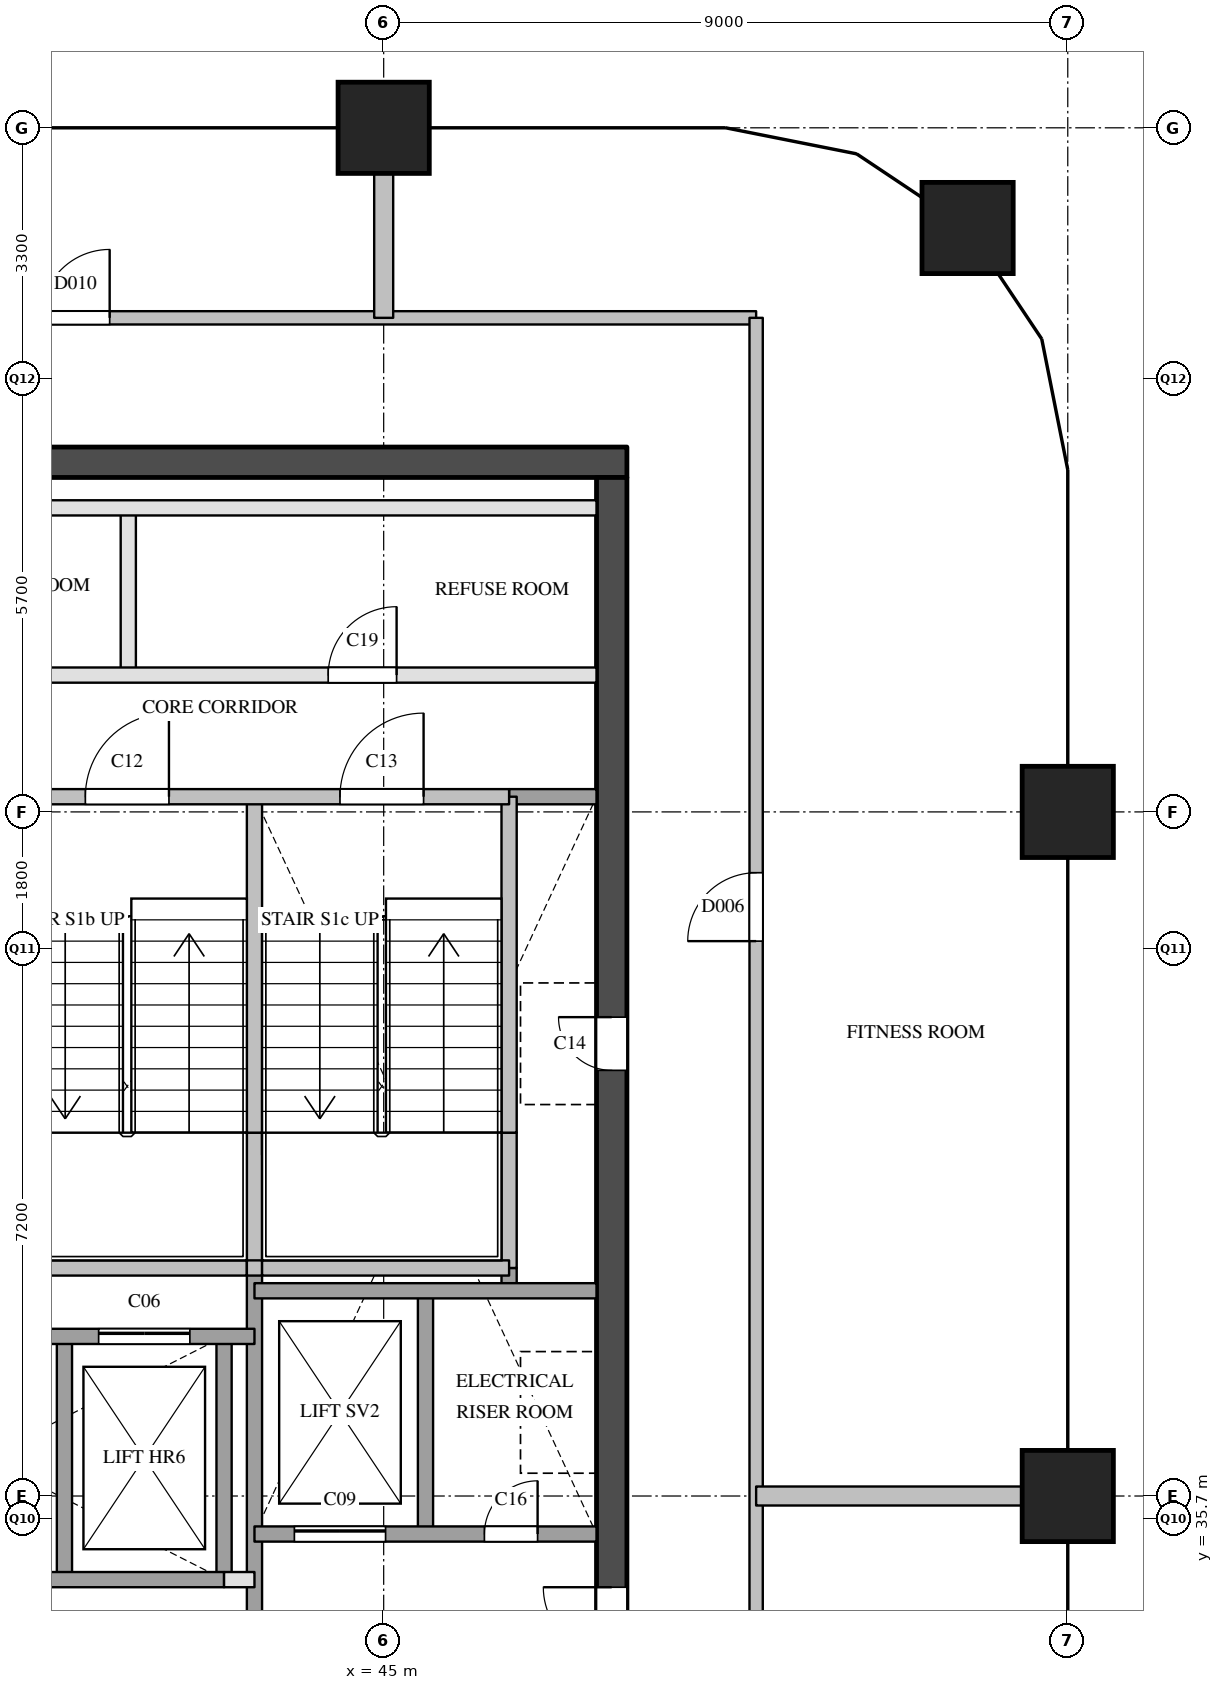
"""IFC4 building model, lengths in metres.
Left out: names, types, materials, properties, quantities, classifications, styles, units other than length and angle.
Written with IfcOpenShell. Run it as: python <this file> out.ifc"""

import sys

from ifc_helpers import new_model, si_unit, direction, frame, frame_2d, origin, origin_2d, place, context, subcontext, project, spatial, rectangle, extrude, element, fill, save


model = new_model("IFC4")
c1 = context("Model", 3, precision=1e-05, world=origin(), true_north=direction((0.0, 1.0)))
c2 = subcontext(c1, "Body", "Model", "MODEL_VIEW")
j1 = project(units=[si_unit("LENGTHUNIT", "METRE"), si_unit("PLANEANGLEUNIT", "RADIAN")], contexts=[c1])
p1 = place(None, origin())
s1 = spatial("IfcSite", under=j1, at=p1, CompositionType="ELEMENT")
p2 = place(p1, origin())
s2 = spatial("IfcBuilding", under=s1, at=p2, CompositionType="ELEMENT")
p3 = place(p2, frame((0.0, 0.0, 218.9)))
s3 = spatial("IfcBuildingStorey", under=s2, at=p3, CompositionType="ELEMENT", Elevation=218.9)
for number, where, z_axis, x_axis in (
    (1, (45.0, 54.0, 0.0), (0.0, 0.0, 1.0), (1.0, 0.0, 0.0)),
    (2, (54.0, 36.0, 0.0), (0.0, 0.0, 1.0), (1.0, 0.0, 0.0)),
    (3, (54.0, 45.0, 0.0), (0.0, 0.0, 1.0), (1.0, 0.0, 0.0)),
    (4, (52.682, 52.682, 0.0), (0.0, 0.0, 1.0), (1.0, 0.0, 0.0)),
):
    element("IfcColumn", number, at=place(p3, frame(where, z_axis=z_axis, x_axis=x_axis)), inside=s3, PredefinedType="COLUMN", context=c2, shape_type="SweptSolid", body=[
        extrude(rectangle(XDim=1.2, YDim=1.2, at=origin_2d()), origin(), (0.0, 0.0, 1.0), 3.9),
    ])
p4 = place(p3, frame((36.2, 49.6, 0.0), z_axis=(0.0, 0.0, 1.0), x_axis=(1.0, 0.0, 0.0)))
e5 = element("IfcWall", 5, at=p4, inside=s3, PredefinedType="SHEAR", context=c2, shape_type="SweptSolid", body=[
    extrude(rectangle(XDim=12.0, YDim=0.4, at=frame_2d((6.0, 0.0))), origin(), (0.0, 0.0, 1.0), 3.6),
])
p5 = place(p3, frame((48.0, 29.1, 0.0), z_axis=(0.0, 0.0, 1.0), x_axis=(0.0, 1.0, 0.0)))
e6 = element("IfcWall", 6, at=p5, inside=s3, PredefinedType="SHEAR", context=c2, shape_type="SweptSolid", body=[
    extrude(rectangle(XDim=20.3, YDim=0.4, at=frame_2d((10.15, 0.0))), origin(), (0.0, 0.0, 1.0), 3.6),
])
p6 = place(p5, frame((12.5, 0.0, 0.0)))
e7 = element("IfcOpeningElement", 7, at=p6, cuts=e6, PredefinedType="OPENING", context=c2, shape_type="SweptSolid", body=[
    extrude(rectangle(XDim=0.7, YDim=2.1, at=frame_2d((0.35, 1.05))), frame((0.0, 0.21, 0.0), z_axis=(0.0, -1.0, 0.0), x_axis=(1.0, 0.0, 0.0)), (0.0, 0.0, 1.0), 0.42),
])
p7 = place(p5, frame((3.9, 0.0, 0.0)))
e8 = element("IfcOpeningElement", 8, at=p7, cuts=e6, PredefinedType="OPENING", context=c2, shape_type="SweptSolid", body=[
    extrude(rectangle(XDim=1.8, YDim=2.1, at=frame_2d((0.9, 1.05))), frame((0.0, 0.21, 0.0), z_axis=(0.0, -1.0, 0.0), x_axis=(1.0, 0.0, 0.0)), (0.0, 0.0, 1.0), 0.42),
])
p8 = place(p3, frame((40.8, 34.9, 0.0), z_axis=(0.0, 0.0, 1.0), x_axis=(0.0, 1.0, 0.0)))
e9 = element("IfcWall", 9, at=p8, inside=s3, PredefinedType="SOLIDWALL", context=c2, shape_type="SweptSolid", body=[
    extrude(rectangle(XDim=3.2, YDim=0.2, at=frame_2d((1.6, 0.0))), origin(), (0.0, 0.0, 1.0), 3.6),
])
p9 = place(p3, frame((41.64, 46.8, 0.0), z_axis=(0.0, 0.0, 1.0), x_axis=(0.0, 1.0, 0.0)))
e10 = element("IfcWall", 10, at=p9, inside=s3, PredefinedType="PARTITIONING", context=c2, shape_type="SweptSolid", body=[
    extrude(rectangle(XDim=2.2, YDim=0.2, at=frame_2d((1.1, 0.0))), origin(), (0.0, 0.0, 1.0), 3.6),
])
p10 = place(p3, frame((42.9, 34.9, 0.0), z_axis=(0.0, 0.0, 1.0), x_axis=(0.0, 1.0, 0.0)))
e11 = element("IfcWall", 11, at=p10, inside=s3, PredefinedType="SOLIDWALL", context=c2, shape_type="SweptSolid", body=[
    extrude(rectangle(XDim=3.2, YDim=0.2, at=frame_2d((1.6, 0.0))), origin(), (0.0, 0.0, 1.0), 3.6),
])
p11 = place(p3, frame((43.3, 29.1, 0.0), z_axis=(0.0, 0.0, 1.0), x_axis=(0.0, 1.0, 0.0)))
e12 = element("IfcWall", 12, at=p11, inside=s3, PredefinedType="SOLIDWALL", context=c2, shape_type="SweptSolid", body=[
    extrude(rectangle(XDim=9.9, YDim=0.2, at=frame_2d((4.95, 0.0))), origin(), (0.0, 0.0, 1.0), 3.6),
])
p12 = place(p3, frame((43.3, 39.0, 0.0), z_axis=(0.0, 0.0, 1.0), x_axis=(0.0, 1.0, 0.0)))
e13 = element("IfcWall", 13, at=p12, inside=s3, PredefinedType="SOLIDWALL", context=c2, shape_type="SweptSolid", body=[
    extrude(rectangle(XDim=1.78, YDim=0.2, at=frame_2d((0.89, 0.0))), origin(), (0.0, 0.0, 1.0), 3.6),
])
p13 = place(p3, frame((43.3, 40.78, 0.0), z_axis=(0.0, 0.0, 1.0), x_axis=(0.0, 1.0, 0.0)))
e14 = element("IfcWall", 14, at=p13, inside=s3, PredefinedType="SOLIDWALL", context=c2, shape_type="SweptSolid", body=[
    extrude(rectangle(XDim=4.42, YDim=0.2, at=frame_2d((2.21, 0.0))), origin(), (0.0, 0.0, 1.0), 3.6),
])
p14 = place(p3, frame((45.55, 35.5, 0.0), z_axis=(0.0, 0.0, 1.0), x_axis=(0.0, 1.0, 0.0)))
e15 = element("IfcWall", 15, at=p14, inside=s3, PredefinedType="SOLIDWALL", context=c2, shape_type="SweptSolid", body=[
    extrude(rectangle(XDim=3.2, YDim=0.2, at=frame_2d((1.6, 0.0))), origin(), (0.0, 0.0, 1.0), 3.6),
])
p15 = place(p3, frame((46.65, 38.7, 0.0), z_axis=(0.0, 0.0, 1.0), x_axis=(0.0, 1.0, 0.0)))
e16 = element("IfcWall", 16, at=p15, inside=s3, PredefinedType="SOLIDWALL", context=c2, shape_type="SweptSolid", body=[
    extrude(rectangle(XDim=0.3, YDim=0.2, at=frame_2d((0.15, 0.0))), origin(), (0.0, 0.0, 1.0), 3.6),
])
p16 = place(p3, frame((46.65, 39.0, 0.0), z_axis=(0.0, 0.0, 1.0), x_axis=(0.0, 1.0, 0.0)))
e17 = element("IfcWall", 17, at=p16, inside=s3, PredefinedType="SOLIDWALL", context=c2, shape_type="SweptSolid", body=[
    extrude(rectangle(XDim=1.78, YDim=0.2, at=frame_2d((0.89, 0.0))), origin(), (0.0, 0.0, 1.0), 3.6),
])
p17 = place(p3, frame((46.65, 40.78, 0.0), z_axis=(0.0, 0.0, 1.0), x_axis=(0.0, 1.0, 0.0)))
e18 = element("IfcWall", 18, at=p17, inside=s3, PredefinedType="SOLIDWALL", context=c2, shape_type="SweptSolid", body=[
    extrude(rectangle(XDim=4.42, YDim=0.2, at=frame_2d((2.21, 0.0))), origin(), (0.0, 0.0, 1.0), 3.6),
])
p18 = place(p3, frame((42.9, 34.9, 0.0), z_axis=(0.0, 0.0, 1.0), x_axis=(1.0, 0.0, 0.0)))
e19 = element("IfcWall", 19, at=p18, inside=s3, PredefinedType="PARTITIONING", context=c2, shape_type="SweptSolid", body=[
    extrude(rectangle(XDim=0.4, YDim=0.2, at=frame_2d((0.2, 0.0))), origin(), (0.0, 0.0, 1.0), 3.6),
])
p19 = place(p3, frame((36.6, 34.9, 0.0), z_axis=(0.0, 0.0, 1.0), x_axis=(1.0, 0.0, 0.0)))
e20 = element("IfcWall", 20, at=p19, inside=s3, PredefinedType="SOLIDWALL", context=c2, shape_type="SweptSolid", body=[
    extrude(rectangle(XDim=6.3, YDim=0.2, at=frame_2d((3.15, 0.0))), origin(), (0.0, 0.0, 1.0), 3.6),
])
p20 = place(p3, frame((43.3, 35.5, 0.0), z_axis=(0.0, 0.0, 1.0), x_axis=(1.0, 0.0, 0.0)))
e21 = element("IfcWall", 21, at=p20, inside=s3, PredefinedType="SOLIDWALL", context=c2, shape_type="SweptSolid", body=[
    extrude(rectangle(XDim=4.5, YDim=0.2, at=frame_2d((2.25, 0.0))), origin(), (0.0, 0.0, 1.0), 3.6),
])
p21 = place(p20, frame((0.525, 0.0, 0.0)))
e22 = element("IfcOpeningElement", 22, at=p21, cuts=e21, PredefinedType="OPENING", context=c2, shape_type="SweptSolid", body=[
    extrude(rectangle(XDim=1.2, YDim=2.1, at=frame_2d((0.6, 1.05))), frame((0.0, 0.11, 0.0), z_axis=(0.0, -1.0, 0.0), x_axis=(1.0, 0.0, 0.0)), (0.0, 0.0, 1.0), 0.22),
])
p22 = place(p20, frame((3.025, 0.0, 0.0)))
e23 = element("IfcOpeningElement", 23, at=p22, cuts=e21, PredefinedType="OPENING", context=c2, shape_type="SweptSolid", body=[
    extrude(rectangle(XDim=0.7, YDim=2.1, at=frame_2d((0.35, 1.05))), frame((0.0, 0.11, 0.0), z_axis=(0.0, -1.0, 0.0), x_axis=(1.0, 0.0, 0.0)), (0.0, 0.0, 1.0), 0.22),
])
p23 = place(p3, frame((36.6, 38.1, 0.0), z_axis=(0.0, 0.0, 1.0), x_axis=(1.0, 0.0, 0.0)))
e24 = element("IfcWall", 24, at=p23, inside=s3, PredefinedType="SOLIDWALL", context=c2, shape_type="SweptSolid", body=[
    extrude(rectangle(XDim=6.7, YDim=0.2, at=frame_2d((3.35, 0.0))), origin(), (0.0, 0.0, 1.0), 3.6),
])
p24 = place(p23, frame((0.45, 0.0, 0.0)))
e25 = element("IfcOpeningElement", 25, at=p24, cuts=e24, PredefinedType="OPENING", context=c2, shape_type="SweptSolid", body=[
    extrude(rectangle(XDim=1.2, YDim=2.1, at=frame_2d((0.6, 1.05))), frame((0.0, 0.11, 0.0), z_axis=(0.0, -1.0, 0.0), x_axis=(1.0, 0.0, 0.0)), (0.0, 0.0, 1.0), 0.22),
])
p25 = place(p23, frame((2.55, 0.0, 0.0)))
e26 = element("IfcOpeningElement", 26, at=p25, cuts=e24, PredefinedType="OPENING", context=c2, shape_type="SweptSolid", body=[
    extrude(rectangle(XDim=1.2, YDim=2.1, at=frame_2d((0.6, 1.05))), frame((0.0, 0.11, 0.0), z_axis=(0.0, -1.0, 0.0), x_axis=(1.0, 0.0, 0.0)), (0.0, 0.0, 1.0), 0.22),
])
p26 = place(p23, frame((4.65, 0.0, 0.0)))
e27 = element("IfcOpeningElement", 27, at=p26, cuts=e24, PredefinedType="OPENING", context=c2, shape_type="SweptSolid", body=[
    extrude(rectangle(XDim=1.2, YDim=2.1, at=frame_2d((0.6, 1.05))), frame((0.0, 0.11, 0.0), z_axis=(0.0, -1.0, 0.0), x_axis=(1.0, 0.0, 0.0)), (0.0, 0.0, 1.0), 0.22),
])
p27 = place(p3, frame((43.3, 38.7, 0.0), z_axis=(0.0, 0.0, 1.0), x_axis=(1.0, 0.0, 0.0)))
e28 = element("IfcWall", 28, at=p27, inside=s3, PredefinedType="SOLIDWALL", context=c2, shape_type="SweptSolid", body=[
    extrude(rectangle(XDim=4.5, YDim=0.2, at=frame_2d((2.25, 0.0))), origin(), (0.0, 0.0, 1.0), 3.6),
])
p28 = place(p3, frame((40.05, 39.0, 0.0), z_axis=(0.0, 0.0, 1.0), x_axis=(1.0, 0.0, 0.0)))
e29 = element("IfcWall", 29, at=p28, inside=s3, PredefinedType="SOLIDWALL", context=c2, shape_type="SweptSolid", body=[
    extrude(rectangle(XDim=3.15, YDim=0.2, at=frame_2d((1.575, 0.0))), origin(), (0.0, 0.0, 1.0), 3.6),
])
p29 = place(p3, frame((43.2, 39.0, 0.0), z_axis=(0.0, 0.0, 1.0), x_axis=(1.0, 0.0, 0.0)))
e30 = element("IfcWall", 30, at=p29, inside=s3, PredefinedType="SOLIDWALL", context=c2, shape_type="SweptSolid", body=[
    extrude(rectangle(XDim=0.2, YDim=0.2, at=frame_2d((0.1, 0.0))), origin(), (0.0, 0.0, 1.0), 3.6),
])
p30 = place(p3, frame((43.4, 39.0, 0.0), z_axis=(0.0, 0.0, 1.0), x_axis=(1.0, 0.0, 0.0)))
e31 = element("IfcWall", 31, at=p30, inside=s3, PredefinedType="SOLIDWALL", context=c2, shape_type="SweptSolid", body=[
    extrude(rectangle(XDim=3.25, YDim=0.2, at=frame_2d((1.625, 0.0))), origin(), (0.0, 0.0, 1.0), 3.6),
])
p31 = place(p3, frame((46.65, 45.2, 0.0), z_axis=(0.0, 0.0, 1.0), x_axis=(1.0, 0.0, 0.0)))
e32 = element("IfcWall", 32, at=p31, inside=s3, PredefinedType="SOLIDWALL", context=c2, shape_type="SweptSolid", body=[
    extrude(rectangle(XDim=1.15, YDim=0.2, at=frame_2d((0.575, 0.0))), origin(), (0.0, 0.0, 1.0), 3.6),
])
p32 = place(p3, frame((36.6, 45.2, 0.0), z_axis=(0.0, 0.0, 1.0), x_axis=(1.0, 0.0, 0.0)))
e33 = element("IfcWall", 33, at=p32, inside=s3, PredefinedType="SOLIDWALL", context=c2, shape_type="SweptSolid", body=[
    extrude(rectangle(XDim=10.05, YDim=0.2, at=frame_2d((5.025, 0.0))), origin(), (0.0, 0.0, 1.0), 3.6),
])
p33 = place(p32, frame((1.125, 0.0, 0.0)))
e34 = element("IfcOpeningElement", 34, at=p33, cuts=e33, PredefinedType="OPENING", context=c2, shape_type="SweptSolid", body=[
    extrude(rectangle(XDim=1.1, YDim=2.1, at=frame_2d((0.55, 1.05))), frame((0.0, 0.11, 0.0), z_axis=(0.0, -1.0, 0.0), x_axis=(1.0, 0.0, 0.0)), (0.0, 0.0, 1.0), 0.22),
])
p34 = place(p32, frame((4.475, 0.0, 0.0)))
e35 = element("IfcOpeningElement", 35, at=p34, cuts=e33, PredefinedType="OPENING", context=c2, shape_type="SweptSolid", body=[
    extrude(rectangle(XDim=1.1, YDim=2.1, at=frame_2d((0.55, 1.05))), frame((0.0, 0.11, 0.0), z_axis=(0.0, -1.0, 0.0), x_axis=(1.0, 0.0, 0.0)), (0.0, 0.0, 1.0), 0.22),
])
p35 = place(p32, frame((7.825, 0.0, 0.0)))
e36 = element("IfcOpeningElement", 36, at=p35, cuts=e33, PredefinedType="OPENING", context=c2, shape_type="SweptSolid", body=[
    extrude(rectangle(XDim=1.1, YDim=2.1, at=frame_2d((0.55, 1.05))), frame((0.0, 0.11, 0.0), z_axis=(0.0, -1.0, 0.0), x_axis=(1.0, 0.0, 0.0)), (0.0, 0.0, 1.0), 0.22),
])
p36 = place(p3, frame((36.6, 46.8, 0.0), z_axis=(0.0, 0.0, 1.0), x_axis=(1.0, 0.0, 0.0)))
e37 = element("IfcWall", 37, at=p36, inside=s3, PredefinedType="PARTITIONING", context=c2, shape_type="SweptSolid", body=[
    extrude(rectangle(XDim=11.2, YDim=0.2, at=frame_2d((5.6, 0.0))), origin(), (0.0, 0.0, 1.0), 3.6),
])
p37 = place(p36, frame((2.07, 0.0, 0.0)))
e38 = element("IfcOpeningElement", 38, at=p37, cuts=e37, PredefinedType="OPENING", context=c2, shape_type="SweptSolid", body=[
    extrude(rectangle(XDim=0.9, YDim=2.1, at=frame_2d((0.45, 1.05))), frame((0.0, 0.11, 0.0), z_axis=(0.0, -1.0, 0.0), x_axis=(1.0, 0.0, 0.0)), (0.0, 0.0, 1.0), 0.22),
])
p38 = place(p36, frame((7.67, 0.0, 0.0)))
e39 = element("IfcOpeningElement", 39, at=p38, cuts=e37, PredefinedType="OPENING", context=c2, shape_type="SweptSolid", body=[
    extrude(rectangle(XDim=0.9, YDim=2.1, at=frame_2d((0.45, 1.05))), frame((0.0, 0.11, 0.0), z_axis=(0.0, -1.0, 0.0), x_axis=(1.0, 0.0, 0.0)), (0.0, 0.0, 1.0), 0.22),
])
p39 = place(p3, frame((36.6, 49.0, 0.0), z_axis=(0.0, 0.0, 1.0), x_axis=(1.0, 0.0, 0.0)))
e40 = element("IfcWall", 40, at=p39, inside=s3, PredefinedType="PARTITIONING", context=c2, shape_type="SweptSolid", body=[
    extrude(rectangle(XDim=11.2, YDim=0.2, at=frame_2d((5.6, 0.0))), origin(), (0.0, 0.0, 1.0), 3.6),
])
p40 = place(p3, frame((34.5, 51.5, 0.0), z_axis=(0.0, 0.0, 1.0), x_axis=(1.0, 0.0, 0.0)))
e41 = element("IfcWall", 41, at=p40, inside=s3, PredefinedType="PARTITIONING", context=c2, shape_type="SweptSolid", body=[
    extrude(rectangle(XDim=15.4, YDim=0.175, at=frame_2d((7.7, 0.0))), origin(), (0.0, 0.0, 1.0), 3.6),
])
p41 = place(p40, frame((5.995, 0.0, 0.0)))
e42 = element("IfcOpeningElement", 42, at=p41, cuts=e41, PredefinedType="OPENING", context=c2, shape_type="SweptSolid", body=[
    extrude(rectangle(XDim=0.9, YDim=2.1, at=frame_2d((0.45, 1.05))), frame((0.0, 0.097, 0.0), z_axis=(0.0, -1.0, 0.0), x_axis=(1.0, 0.0, 0.0)), (0.0, 0.0, 1.0), 0.195),
])
p42 = place(p3, frame((49.9, 28.5, 0.0), z_axis=(0.0, 0.0, 1.0), x_axis=(0.0, 1.0, 0.0)))
e43 = element("IfcWall", 43, at=p42, inside=s3, PredefinedType="PARTITIONING", context=c2, shape_type="SweptSolid", body=[
    extrude(rectangle(XDim=23.0, YDim=0.175, at=frame_2d((11.5, 0.0))), origin(), (0.0, 0.0, 1.0), 3.6),
])
p43 = place(p42, frame((14.8, 0.0, 0.0)))
e44 = element("IfcOpeningElement", 44, at=p43, cuts=e43, PredefinedType="OPENING", context=c2, shape_type="SweptSolid", body=[
    extrude(rectangle(XDim=0.9, YDim=2.1, at=frame_2d((0.45, 1.05))), frame((0.0, 0.097, 0.0), z_axis=(0.0, -1.0, 0.0), x_axis=(1.0, 0.0, 0.0)), (0.0, 0.0, 1.0), 0.195),
])
p44 = place(p3, frame((49.9, 36.0, 0.0), z_axis=(0.0, 0.0, 1.0), x_axis=(1.0, 0.0, 0.0)))
e45 = element("IfcWall", 45, at=p44, inside=s3, PredefinedType="PARTITIONING", context=c2, shape_type="SweptSolid", body=[
    extrude(rectangle(XDim=4.1, YDim=0.25, at=frame_2d((2.05, 0.0))), origin(), (0.0, 0.0, 1.0), 3.6),
])
p45 = place(p3, frame((45.0, 51.5, 0.0), z_axis=(0.0, 0.0, 1.0), x_axis=(0.0, 1.0, 0.0)))
e46 = element("IfcWall", 46, at=p45, inside=s3, PredefinedType="PARTITIONING", context=c2, shape_type="SweptSolid", body=[
    extrude(rectangle(XDim=2.5, YDim=0.25, at=frame_2d((1.25, 0.0))), origin(), (0.0, 0.0, 1.0), 3.6),
])
p46 = place(p26, origin())
e47 = element("IfcDoor", 47, at=p46, inside=s3, OperationType="SLIDING_TO_LEFT", PredefinedType="DOOR", context=c2, shape_type="SweptSolid", body=[
    extrude(rectangle(XDim=1.2, YDim=2.1, at=frame_2d((0.6, 1.05))), frame((0.0, 0.025, 0.0), z_axis=(0.0, -1.0, 0.0), x_axis=(1.0, 0.0, 0.0)), (0.0, 0.0, 1.0), 0.05),
])
fill(e27, e47)
p47 = place(p21, origin())
e48 = element("IfcDoor", 48, at=p47, inside=s3, OperationType="SLIDING_TO_LEFT", PredefinedType="DOOR", context=c2, shape_type="SweptSolid", body=[
    extrude(rectangle(XDim=1.2, YDim=2.1, at=frame_2d((0.6, 1.05))), frame((0.0, 0.025, 0.0), z_axis=(0.0, -1.0, 0.0), x_axis=(1.0, 0.0, 0.0)), (0.0, 0.0, 1.0), 0.05),
])
fill(e22, e48)
p48 = place(p34, origin())
e49 = element("IfcDoor", 49, at=p48, inside=s3, OperationType="SINGLE_SWING_RIGHT", PredefinedType="DOOR", context=c2, shape_type="SweptSolid", body=[
    extrude(rectangle(XDim=1.1, YDim=2.1, at=frame_2d((0.55, 1.05))), frame((0.0, 0.025, 0.0), z_axis=(0.0, -1.0, 0.0), x_axis=(1.0, 0.0, 0.0)), (0.0, 0.0, 1.0), 0.05),
])
fill(e35, e49)
p49 = place(p35, origin())
e50 = element("IfcDoor", 50, at=p49, inside=s3, OperationType="SINGLE_SWING_RIGHT", PredefinedType="DOOR", context=c2, shape_type="SweptSolid", body=[
    extrude(rectangle(XDim=1.1, YDim=2.1, at=frame_2d((0.55, 1.05))), frame((0.0, 0.025, 0.0), z_axis=(0.0, -1.0, 0.0), x_axis=(1.0, 0.0, 0.0)), (0.0, 0.0, 1.0), 0.05),
])
fill(e36, e50)
p50 = place(p6, origin())
e51 = element("IfcDoor", 51, at=p50, inside=s3, OperationType="SINGLE_SWING_RIGHT", PredefinedType="DOOR", context=c2, shape_type="SweptSolid", body=[
    extrude(rectangle(XDim=0.7, YDim=2.1, at=frame_2d((0.35, 1.05))), frame((0.0, 0.025, 0.0), z_axis=(0.0, -1.0, 0.0), x_axis=(1.0, 0.0, 0.0)), (0.0, 0.0, 1.0), 0.05),
])
fill(e7, e51)
p51 = place(p7, origin())
e52 = element("IfcDoor", 52, at=p51, inside=s3, OperationType="DOUBLE_DOOR_SINGLE_SWING", PredefinedType="DOOR", context=c2, shape_type="SweptSolid", body=[
    extrude(rectangle(XDim=1.8, YDim=2.1, at=frame_2d((0.9, 1.05))), frame((0.0, 0.025, 0.0), z_axis=(0.0, -1.0, 0.0), x_axis=(1.0, 0.0, 0.0)), (0.0, 0.0, 1.0), 0.05),
])
fill(e8, e52)
p52 = place(p22, origin())
e53 = element("IfcDoor", 53, at=p52, inside=s3, OperationType="SINGLE_SWING_RIGHT", PredefinedType="DOOR", context=c2, shape_type="SweptSolid", body=[
    extrude(rectangle(XDim=0.7, YDim=2.1, at=frame_2d((0.35, 1.05))), frame((0.0, 0.025, 0.0), z_axis=(0.0, -1.0, 0.0), x_axis=(1.0, 0.0, 0.0)), (0.0, 0.0, 1.0), 0.05),
])
fill(e23, e53)
p53 = place(p38, origin())
e54 = element("IfcDoor", 54, at=p53, inside=s3, OperationType="SINGLE_SWING_RIGHT", PredefinedType="DOOR", context=c2, shape_type="SweptSolid", body=[
    extrude(rectangle(XDim=0.9, YDim=2.1, at=frame_2d((0.45, 1.05))), frame((0.0, 0.025, 0.0), z_axis=(0.0, -1.0, 0.0), x_axis=(1.0, 0.0, 0.0)), (0.0, 0.0, 1.0), 0.05),
])
fill(e39, e54)
p54 = place(p43, origin())
e55 = element("IfcDoor", 55, at=p54, inside=s3, OperationType="SINGLE_SWING_LEFT", PredefinedType="DOOR", context=c2, shape_type="SweptSolid", body=[
    extrude(rectangle(XDim=0.9, YDim=2.1, at=frame_2d((0.45, 1.05))), frame((0.0, 0.025, 0.0), z_axis=(0.0, -1.0, 0.0), x_axis=(1.0, 0.0, 0.0)), (0.0, 0.0, 1.0), 0.05),
])
fill(e44, e55)
p55 = place(p41, origin())
e56 = element("IfcDoor", 56, at=p55, inside=s3, OperationType="SINGLE_SWING_RIGHT", PredefinedType="DOOR", context=c2, shape_type="SweptSolid", body=[
    extrude(rectangle(XDim=0.9, YDim=2.1, at=frame_2d((0.45, 1.05))), frame((0.0, 0.025, 0.0), z_axis=(0.0, -1.0, 0.0), x_axis=(1.0, 0.0, 0.0)), (0.0, 0.0, 1.0), 0.05),
])
fill(e42, e56)
save(model, sys.argv[1])
